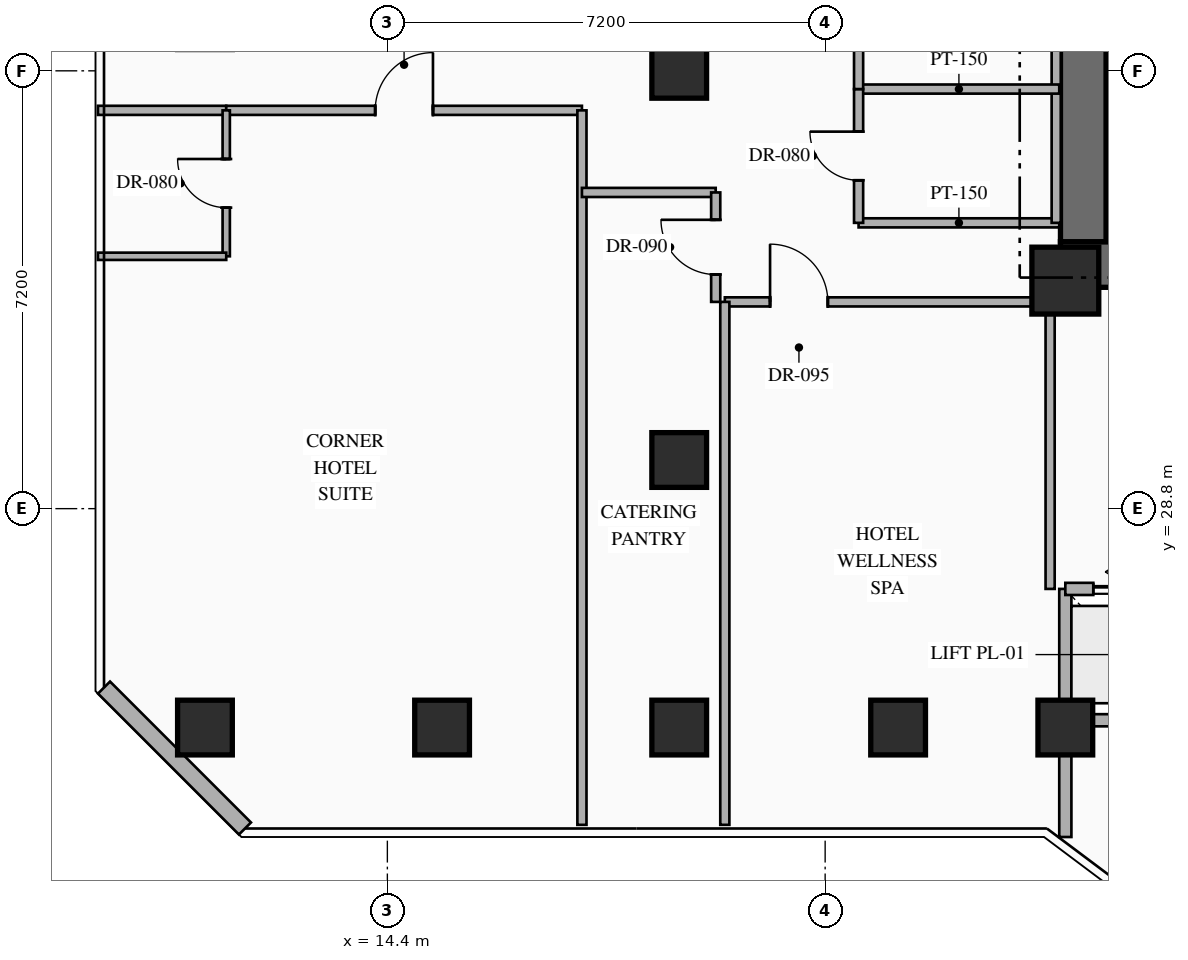
"""IFC4 building model, lengths in metres.
Left out: names, types, materials, properties, quantities, classifications, styles, units other than length and angle.
Written with IfcOpenShell. Run it as: python <this file> out.ifc"""

import sys

from ifc_helpers import new_model, si_unit, direction, frame, frame_2d, origin, origin_2d, place, context, subcontext, project, spatial, rectangle, hollow_rectangle, extrude, element, fill, save


model = new_model("IFC4")
c1 = context("Model", 3, precision=1e-05, world=origin(), true_north=direction((0.0, 1.0)))
c2 = subcontext(c1, "Body", "Model", "MODEL_VIEW")
j1 = project(units=[si_unit("LENGTHUNIT", "METRE"), si_unit("PLANEANGLEUNIT", "RADIAN")], contexts=[c1])
p1 = place(None, origin())
s1 = spatial("IfcSite", under=j1, at=p1, CompositionType="ELEMENT")
p2 = place(p1, origin())
s2 = spatial("IfcBuilding", under=s1, at=p2, CompositionType="ELEMENT")
p3 = place(p2, frame((0.0, 0.0, 88.0)))
s3 = spatial("IfcBuildingStorey", under=s2, at=p3, CompositionType="ELEMENT", Elevation=88.0)
p4 = place(p3, frame((25.47, 32.815, 0.0), z_axis=(0.0, 0.0, 1.0), x_axis=(1.0, 0.0, 0.0)))
e1 = element("IfcWall", 1, at=p4, inside=s3, PredefinedType="SHEAR", context=c2, shape_type="SweptSolid", body=[
    extrude(rectangle(XDim=8.08, YDim=0.75, at=frame_2d((4.04, 0.0))), origin(), (0.0, 0.0, 1.0), 3.35),
])
p5 = place(p4, frame((2.98, 0.0, 0.0)))
e2 = element("IfcOpeningElement", 2, at=p5, cuts=e1, PredefinedType="OPENING", context=c2, shape_type="SweptSolid", body=[
    extrude(rectangle(XDim=1.1, YDim=2.2, at=frame_2d((0.55, 1.1))), frame((0.0, 0.385, 0.0), z_axis=(0.0, -1.0, 0.0), x_axis=(1.0, 0.0, 0.0)), (0.0, 0.0, 1.0), 0.77),
])
p6 = place(p4, frame((5.73, 0.0, 0.0)))
e3 = element("IfcOpeningElement", 3, at=p6, cuts=e1, PredefinedType="OPENING", context=c2, shape_type="SweptSolid", body=[
    extrude(rectangle(XDim=1.1, YDim=2.15, at=frame_2d((0.55, 1.075))), frame((0.0, 0.385, 0.0), z_axis=(0.0, -1.0, 0.0), x_axis=(1.0, 0.0, 0.0)), (0.0, 0.0, 1.0), 0.77),
])
p7 = place(p3, frame((25.845, 33.19, 0.0), z_axis=(0.0, 0.0, 1.0), x_axis=(0.0, 1.0, 0.0)))
e4 = element("IfcWall", 4, at=p7, inside=s3, PredefinedType="SHEAR", context=c2, shape_type="SweptSolid", body=[
    extrude(rectangle(XDim=9.48, YDim=0.75, at=frame_2d((4.74, 0.0))), origin(), (0.0, 0.0, 1.0), 3.35),
])
p8 = place(p3, frame((25.55, 32.55, 0.0), z_axis=(0.0, 0.0, 1.0), x_axis=(1.0, 0.0, 0.0)))
e5 = element("IfcColumn", 5, at=p8, inside=s3, PredefinedType="COLUMN", context=c2, shape_type="SweptSolid", body=[
    extrude(rectangle(XDim=1.1, YDim=1.1, at=origin_2d()), origin(), (0.0, 0.0, 1.0), 3.35),
])
for number, where, z_axis, x_axis in (
    (6, (25.55, 25.2, 0.0), (0.0, 0.0, 1.0), (1.0, 0.0, 0.0)),
    (7, (11.4, 25.2, 0.0), (0.0, 0.0, 1.0), (1.0, 0.0, 0.0)),
    (8, (19.2, 25.2, 0.0), (0.0, 0.0, 1.0), (1.0, 0.0, 0.0)),
    (9, (19.2, 29.6, 0.0), (0.0, 0.0, 1.0), (1.0, 0.0, 0.0)),
    (10, (22.8, 25.2, 0.0), (0.0, 0.0, 1.0), (1.0, 0.0, 0.0)),
    (11, (19.2, 36.0, 0.0), (0.0, 0.0, 1.0), (1.0, 0.0, 0.0)),
    (12, (15.3, 25.2, 0.0), (0.0, 0.0, 1.0), (1.0, 0.0, 0.0)),
):
    element("IfcColumn", number, at=place(p3, frame(where, z_axis=z_axis, x_axis=x_axis)), inside=s3, PredefinedType="COLUMN", context=c2, shape_type="SweptSolid", body=[
        extrude(hollow_rectangle(XDim=0.9, YDim=0.9, WallThickness=0.036, at=origin_2d()), origin(), (0.0, 0.0, 1.0), 3.35),
    ])
p9 = place(p3, frame((12.058, 23.54, 0.0), z_axis=(0.0, 0.0, 1.0), x_axis=(-0.707144017911, 0.707069542501, 0.0)))
e13 = element("IfcWall", 13, at=p9, inside=s3, PredefinedType="STANDARD", context=c2, shape_type="SweptSolid", body=[
    extrude(rectangle(XDim=3.278, YDim=0.28, at=frame_2d((1.639, 0.0))), origin(), (0.0, 0.0, 1.0), 3.05),
])
p10 = place(p3, frame((25.55, 23.4, 0.0), z_axis=(0.0, 0.0, 1.0), x_axis=(0.0, 1.0, 0.0)))
e14 = element("IfcWall", 14, at=p10, inside=s3, PredefinedType="STANDARD", context=c2, shape_type="SweptSolid", body=[
    extrude(rectangle(XDim=4.08, YDim=0.2, at=frame_2d((2.04, 0.0))), origin(), (0.0, 0.0, 1.0), 2.345),
])
p11 = place(p3, frame((25.55, 25.32, 0.0), z_axis=(0.0, 0.0, 1.0), x_axis=(1.0, 0.0, 0.0)))
e15 = element("IfcWall", 15, at=p11, inside=s3, PredefinedType="STANDARD", context=c2, shape_type="SweptSolid", body=[
    extrude(rectangle(XDim=7.88, YDim=0.2, at=frame_2d((3.94, 0.0))), origin(), (0.0, 0.0, 1.0), 2.445),
])
p12 = place(p3, frame((25.55, 27.48, 0.0), z_axis=(0.0, 0.0, 1.0), x_axis=(1.0, 0.0, 0.0)))
e16 = element("IfcWall", 16, at=p12, inside=s3, PredefinedType="STANDARD", context=c2, shape_type="SweptSolid", body=[
    extrude(rectangle(XDim=7.88, YDim=0.2, at=frame_2d((3.94, 0.0))), origin(), (0.0, 0.0, 1.0), 3.05),
])
p13 = place(p12, frame((0.46, 0.0, 0.0)))
e17 = element("IfcOpeningElement", 17, at=p13, cuts=e16, PredefinedType="OPENING", context=c2, shape_type="SweptSolid", body=[
    extrude(rectangle(XDim=1.08, YDim=2.15, at=frame_2d((0.54, 1.075))), frame((0.0, 0.11, 0.0), z_axis=(0.0, -1.0, 0.0), x_axis=(1.0, 0.0, 0.0)), (0.0, 0.0, 1.0), 0.22),
])
p14 = place(p12, frame((2.42, 0.0, 0.0)))
e18 = element("IfcOpeningElement", 18, at=p14, cuts=e16, PredefinedType="OPENING", context=c2, shape_type="SweptSolid", body=[
    extrude(rectangle(XDim=1.08, YDim=2.15, at=frame_2d((0.54, 1.075))), frame((0.0, 0.11, 0.0), z_axis=(0.0, -1.0, 0.0), x_axis=(1.0, 0.0, 0.0)), (0.0, 0.0, 1.0), 0.22),
])
p15 = place(p12, frame((4.38, 0.0, 0.0)))
e19 = element("IfcOpeningElement", 19, at=p15, cuts=e16, PredefinedType="OPENING", context=c2, shape_type="SweptSolid", body=[
    extrude(rectangle(XDim=1.08, YDim=2.15, at=frame_2d((0.54, 1.075))), frame((0.0, 0.11, 0.0), z_axis=(0.0, -1.0, 0.0), x_axis=(1.0, 0.0, 0.0)), (0.0, 0.0, 1.0), 0.22),
])
p16 = place(p12, frame((6.34, 0.0, 0.0)))
e20 = element("IfcOpeningElement", 20, at=p16, cuts=e16, PredefinedType="OPENING", context=c2, shape_type="SweptSolid", body=[
    extrude(rectangle(XDim=1.08, YDim=2.15, at=frame_2d((0.54, 1.075))), frame((0.0, 0.11, 0.0), z_axis=(0.0, -1.0, 0.0), x_axis=(1.0, 0.0, 0.0)), (0.0, 0.0, 1.0), 0.22),
])
p17 = place(p3, frame((22.15, 33.5, 0.0), z_axis=(0.0, 0.0, 1.0), x_axis=(1.0, 0.0, 0.0)))
e21 = element("IfcWall", 21, at=p17, inside=s3, PredefinedType="PARTITIONING", context=c2, shape_type="SweptSolid", body=[
    extrude(rectangle(XDim=3.3, YDim=0.15, at=frame_2d((1.65, 0.0))), origin(), (0.0, 0.0, 1.0), 3.05),
])
p18 = place(p3, frame((25.4, 33.5, 0.0), z_axis=(0.0, 0.0, 1.0), x_axis=(0.0, 1.0, 0.0)))
e22 = element("IfcWall", 22, at=p18, inside=s3, PredefinedType="PARTITIONING", context=c2, shape_type="SweptSolid", body=[
    extrude(rectangle(XDim=6.6, YDim=0.15, at=frame_2d((3.3, 0.0))), origin(), (0.0, 0.0, 1.0), 3.05),
])
p19 = place(p3, frame((22.15, 35.7, 0.0), z_axis=(0.0, 0.0, 1.0), x_axis=(1.0, 0.0, 0.0)))
e23 = element("IfcWall", 23, at=p19, inside=s3, PredefinedType="PARTITIONING", context=c2, shape_type="SweptSolid", body=[
    extrude(rectangle(XDim=3.3, YDim=0.15, at=frame_2d((1.65, 0.0))), origin(), (0.0, 0.0, 1.0), 3.05),
])
p20 = place(p3, frame((22.15, 33.5, 0.0), z_axis=(0.0, 0.0, 1.0), x_axis=(0.0, 1.0, 0.0)))
e24 = element("IfcWall", 24, at=p20, inside=s3, PredefinedType="PARTITIONING", context=c2, shape_type="SweptSolid", body=[
    extrude(rectangle(XDim=2.2, YDim=0.15, at=frame_2d((1.1, 0.0))), origin(), (0.0, 0.0, 1.0), 3.05),
])
p21 = place(p20, frame((0.7, 0.0, 0.0)))
e25 = element("IfcOpeningElement", 25, at=p21, cuts=e24, PredefinedType="OPENING", context=c2, shape_type="SweptSolid", body=[
    extrude(rectangle(XDim=0.8, YDim=2.06, at=frame_2d((0.4, 1.03))), frame((0.0, 0.085, 0.0), z_axis=(0.0, -1.0, 0.0), x_axis=(1.0, 0.0, 0.0)), (0.0, 0.0, 1.0), 0.17),
])
p22 = place(p3, frame((22.15, 35.7, 0.0), z_axis=(0.0, 0.0, 1.0), x_axis=(0.0, 1.0, 0.0)))
e26 = element("IfcWall", 26, at=p22, inside=s3, PredefinedType="PARTITIONING", context=c2, shape_type="SweptSolid", body=[
    extrude(rectangle(XDim=2.2, YDim=0.15, at=frame_2d((1.1, 0.0))), origin(), (0.0, 0.0, 1.0), 3.05),
])
p23 = place(p22, frame((0.7, 0.0, 0.0)))
e27 = element("IfcOpeningElement", 27, at=p23, cuts=e26, PredefinedType="OPENING", context=c2, shape_type="SweptSolid", body=[
    extrude(rectangle(XDim=0.8, YDim=2.06, at=frame_2d((0.4, 1.03))), frame((0.0, 0.085, 0.0), z_axis=(0.0, -1.0, 0.0), x_axis=(1.0, 0.0, 0.0)), (0.0, 0.0, 1.0), 0.17),
])
p24 = place(p3, frame((19.95, 32.2, 0.0), z_axis=(0.0, 0.0, 1.0), x_axis=(1.0, 0.0, 0.0)))
e28 = element("IfcWall", 28, at=p24, inside=s3, PredefinedType="PARTITIONING", context=c2, shape_type="SweptSolid", body=[
    extrude(rectangle(XDim=5.35, YDim=0.15, at=frame_2d((2.675, 0.0))), origin(), (0.0, 0.0, 1.0), 3.05),
])
p25 = place(p24, frame((0.744, 0.0, 0.0)))
e29 = element("IfcOpeningElement", 29, at=p25, cuts=e28, PredefinedType="OPENING", context=c2, shape_type="SweptSolid", body=[
    extrude(rectangle(XDim=0.95, YDim=2.15, at=frame_2d((0.475, 1.075))), frame((0.0, 0.085, 0.0), z_axis=(0.0, -1.0, 0.0), x_axis=(1.0, 0.0, 0.0)), (0.0, 0.0, 1.0), 0.17),
])
p26 = place(p3, frame((19.95, 23.6, 0.0), z_axis=(0.0, 0.0, 1.0), x_axis=(0.0, 1.0, 0.0)))
e30 = element("IfcWall", 30, at=p26, inside=s3, PredefinedType="PARTITIONING", context=c2, shape_type="SweptSolid", body=[
    extrude(rectangle(XDim=8.6, YDim=0.15, at=frame_2d((4.3, 0.0))), origin(), (0.0, 0.0, 1.0), 3.05),
])
p27 = place(p3, frame((25.3, 27.48, 0.0), z_axis=(0.0, 0.0, 1.0), x_axis=(0.0, 1.0, 0.0)))
e31 = element("IfcWall", 31, at=p27, inside=s3, PredefinedType="PARTITIONING", context=c2, shape_type="SweptSolid", body=[
    extrude(rectangle(XDim=4.72, YDim=0.15, at=frame_2d((2.36, 0.0))), origin(), (0.0, 0.0, 1.0), 2.345),
])
p28 = place(p3, frame((9.64, 35.35, 0.0), z_axis=(0.0, 0.0, 1.0), x_axis=(1.0, 0.0, 0.0)))
e32 = element("IfcWall", 32, at=p28, inside=s3, PredefinedType="PARTITIONING", context=c2, shape_type="SweptSolid", body=[
    extrude(rectangle(XDim=2.11, YDim=0.15, at=frame_2d((1.055, 0.0))), origin(), (0.0, 0.0, 1.0), 3.05),
])
p29 = place(p3, frame((11.75, 35.35, 0.0), z_axis=(0.0, 0.0, 1.0), x_axis=(1.0, 0.0, 0.0)))
e33 = element("IfcWall", 33, at=p29, inside=s3, PredefinedType="PARTITIONING", context=c2, shape_type="SweptSolid", body=[
    extrude(rectangle(XDim=5.85, YDim=0.15, at=frame_2d((2.925, 0.0))), origin(), (0.0, 0.0, 1.0), 3.05),
])
p30 = place(p29, frame((2.45, 0.0, 0.0)))
e34 = element("IfcOpeningElement", 34, at=p30, cuts=e33, PredefinedType="OPENING", context=c2, shape_type="SweptSolid", body=[
    extrude(rectangle(XDim=0.95, YDim=2.15, at=frame_2d((0.475, 1.075))), frame((0.0, 0.085, 0.0), z_axis=(0.0, -1.0, 0.0), x_axis=(1.0, 0.0, 0.0)), (0.0, 0.0, 1.0), 0.17),
])
p31 = place(p3, frame((11.75, 32.95, 0.0), z_axis=(0.0, 0.0, 1.0), x_axis=(0.0, 1.0, 0.0)))
e35 = element("IfcWall", 35, at=p31, inside=s3, PredefinedType="PARTITIONING", context=c2, shape_type="SweptSolid", body=[
    extrude(rectangle(XDim=2.4, YDim=0.12, at=frame_2d((1.2, 0.0))), origin(), (0.0, 0.0, 1.0), 3.05),
])
p32 = place(p31, frame((0.8, 0.0, 0.0)))
e36 = element("IfcOpeningElement", 36, at=p32, cuts=e35, PredefinedType="OPENING", context=c2, shape_type="SweptSolid", body=[
    extrude(rectangle(XDim=0.8, YDim=2.06, at=frame_2d((0.4, 1.03))), frame((0.0, 0.07, 0.0), z_axis=(0.0, -1.0, 0.0), x_axis=(1.0, 0.0, 0.0)), (0.0, 0.0, 1.0), 0.14),
])
p33 = place(p3, frame((9.64, 32.95, 0.0), z_axis=(0.0, 0.0, 1.0), x_axis=(1.0, 0.0, 0.0)))
e37 = element("IfcWall", 37, at=p33, inside=s3, PredefinedType="PARTITIONING", context=c2, shape_type="SweptSolid", body=[
    extrude(rectangle(XDim=2.11, YDim=0.12, at=frame_2d((1.055, 0.0))), origin(), (0.0, 0.0, 1.0), 3.05),
])
p34 = place(p3, frame((17.6, 23.6, 0.0), z_axis=(0.0, 0.0, 1.0), x_axis=(0.0, 1.0, 0.0)))
e38 = element("IfcWall", 38, at=p34, inside=s3, PredefinedType="PARTITIONING", context=c2, shape_type="SweptSolid", body=[
    extrude(rectangle(XDim=11.75, YDim=0.15, at=frame_2d((5.875, 0.0))), origin(), (0.0, 0.0, 1.0), 3.05),
])
p35 = place(p3, frame((17.6, 34.0, 0.0), z_axis=(0.0, 0.0, 1.0), x_axis=(1.0, 0.0, 0.0)))
e39 = element("IfcWall", 39, at=p35, inside=s3, PredefinedType="PARTITIONING", context=c2, shape_type="SweptSolid", body=[
    extrude(rectangle(XDim=2.2, YDim=0.15, at=frame_2d((1.1, 0.0))), origin(), (0.0, 0.0, 1.0), 3.05),
])
p36 = place(p3, frame((19.8, 32.2, 0.0), z_axis=(0.0, 0.0, 1.0), x_axis=(0.0, 1.0, 0.0)))
e40 = element("IfcWall", 40, at=p36, inside=s3, PredefinedType="PARTITIONING", context=c2, shape_type="SweptSolid", body=[
    extrude(rectangle(XDim=1.8, YDim=0.15, at=frame_2d((0.9, 0.0))), origin(), (0.0, 0.0, 1.0), 3.05),
])
p37 = place(p36, frame((0.45, 0.0, 0.0)))
e41 = element("IfcOpeningElement", 41, at=p37, cuts=e40, PredefinedType="OPENING", context=c2, shape_type="SweptSolid", body=[
    extrude(rectangle(XDim=0.9, YDim=2.15, at=frame_2d((0.45, 1.075))), frame((0.0, 0.085, 0.0), z_axis=(0.0, -1.0, 0.0), x_axis=(1.0, 0.0, 0.0)), (0.0, 0.0, 1.0), 0.17),
])
p38 = place(p13, origin())
e42 = element("IfcDoor", 42, at=p38, inside=s3, OperationType="SLIDING_TO_LEFT", PredefinedType="USERDEFINED", context=c2, shape_type="SweptSolid", body=[
    extrude(rectangle(XDim=1.08, YDim=2.15, at=frame_2d((0.54, 1.075))), frame((0.0, 0.025, 0.0), z_axis=(0.0, -1.0, 0.0), x_axis=(1.0, 0.0, 0.0)), (0.0, 0.0, 1.0), 0.05),
])
fill(e17, e42)
p39 = place(p21, origin())
e43 = element("IfcDoor", 43, at=p39, inside=s3, OperationType="SINGLE_SWING_RIGHT", PredefinedType="DOOR", context=c2, shape_type="SweptSolid", body=[
    extrude(rectangle(XDim=0.8, YDim=2.06, at=frame_2d((0.4, 1.03))), frame((0.0, 0.025, 0.0), z_axis=(0.0, -1.0, 0.0), x_axis=(1.0, 0.0, 0.0)), (0.0, 0.0, 1.0), 0.05),
])
fill(e25, e43)
p40 = place(p25, origin())
e44 = element("IfcDoor", 44, at=p40, inside=s3, OperationType="SINGLE_SWING_LEFT", PredefinedType="DOOR", context=c2, shape_type="SweptSolid", body=[
    extrude(rectangle(XDim=0.95, YDim=2.15, at=frame_2d((0.475, 1.075))), frame((0.0, 0.025, 0.0), z_axis=(0.0, -1.0, 0.0), x_axis=(1.0, 0.0, 0.0)), (0.0, 0.0, 1.0), 0.05),
])
fill(e29, e44)
p41 = place(p30, origin())
e45 = element("IfcDoor", 45, at=p41, inside=s3, OperationType="SINGLE_SWING_RIGHT", PredefinedType="DOOR", context=c2, shape_type="SweptSolid", body=[
    extrude(rectangle(XDim=0.95, YDim=2.15, at=frame_2d((0.475, 1.075))), frame((0.0, 0.025, 0.0), z_axis=(0.0, -1.0, 0.0), x_axis=(1.0, 0.0, 0.0)), (0.0, 0.0, 1.0), 0.05),
])
fill(e34, e45)
p42 = place(p32, origin())
e46 = element("IfcDoor", 46, at=p42, inside=s3, OperationType="SINGLE_SWING_RIGHT", PredefinedType="DOOR", context=c2, shape_type="SweptSolid", body=[
    extrude(rectangle(XDim=0.8, YDim=2.06, at=frame_2d((0.4, 1.03))), frame((0.0, 0.025, 0.0), z_axis=(0.0, -1.0, 0.0), x_axis=(1.0, 0.0, 0.0)), (0.0, 0.0, 1.0), 0.05),
])
fill(e36, e46)
p43 = place(p37, origin())
e47 = element("IfcDoor", 47, at=p43, inside=s3, OperationType="SINGLE_SWING_RIGHT", PredefinedType="DOOR", context=c2, shape_type="SweptSolid", body=[
    extrude(rectangle(XDim=0.9, YDim=2.15, at=frame_2d((0.45, 1.075))), frame((0.0, 0.025, 0.0), z_axis=(0.0, -1.0, 0.0), x_axis=(1.0, 0.0, 0.0)), (0.0, 0.0, 1.0), 0.05),
])
fill(e41, e47)
save(model, sys.argv[1])
